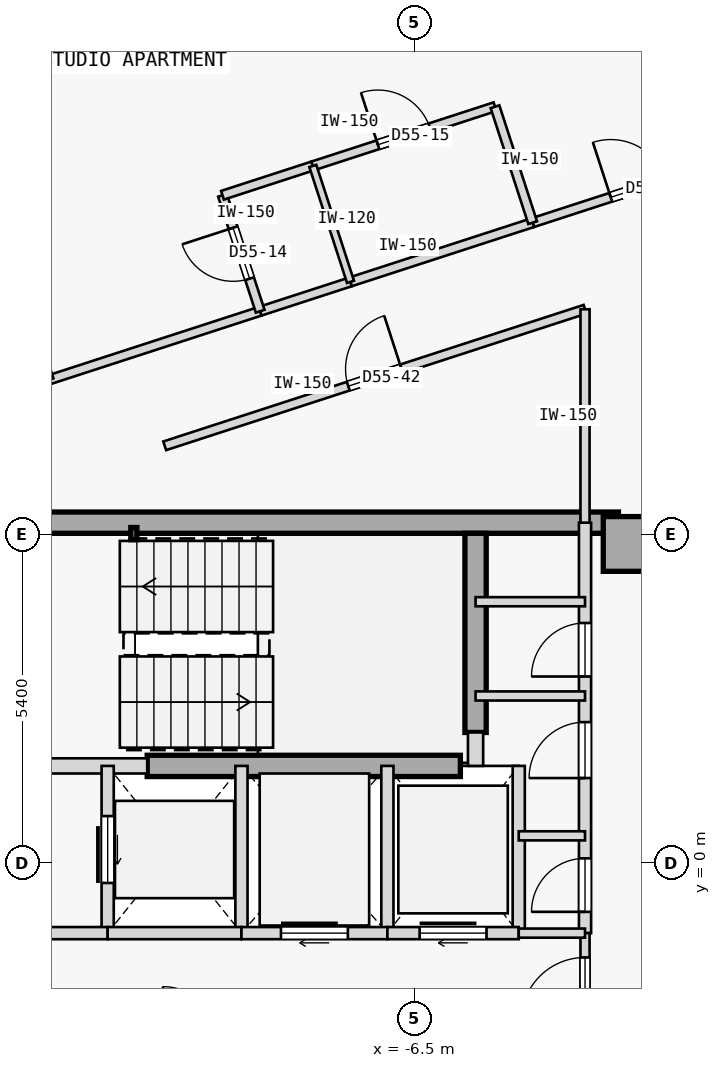
"""IFC4 building model, lengths in metres.
Left out: names, types, materials, properties, quantities, classifications, styles, units other than length and angle.
Written with IfcOpenShell. Run it as: python <this file> out.ifc"""

import sys

from ifc_helpers import new_model, si_unit, direction, frame, frame_2d, origin, origin_2d, place, context, subcontext, project, spatial, rectangle, hollow_rectangle, extrude, element, fill, save


model = new_model("IFC4")
c1 = context("Model", 3, precision=1e-05, world=origin(), true_north=direction((0.0, 1.0)))
c2 = subcontext(c1, "Body", "Model", "MODEL_VIEW")
j1 = project(units=[si_unit("LENGTHUNIT", "METRE"), si_unit("PLANEANGLEUNIT", "RADIAN")], contexts=[c1])
p1 = place(None, origin())
s1 = spatial("IfcSite", under=j1, at=p1, CompositionType="ELEMENT")
p2 = place(p1, origin())
s2 = spatial("IfcBuilding", under=s1, at=p2, CompositionType="ELEMENT")
p3 = place(p2, frame((0.0, 0.0, 210.9)))
s3 = spatial("IfcBuildingStorey", under=s2, at=p3, CompositionType="ELEMENT", Elevation=210.9)
p4 = place(p3, frame((-2.95, 5.25, 0.0), z_axis=(0.0, 0.0, 1.0), x_axis=(1.0, 0.0, 0.0)))
e1 = element("IfcColumn", 1, at=p4, inside=s3, PredefinedType="COLUMN", context=c2, shape_type="SweptSolid", body=[
    extrude(rectangle(XDim=0.9, YDim=0.9, at=origin_2d()), origin(), (0.0, 0.0, 1.0), 3.35),
])
p5 = place(p3, frame((-14.56, 5.6, 0.0), z_axis=(0.0, 0.0, 1.0), x_axis=(1.0, 0.0, 0.0)))
e2 = element("IfcWall", 2, at=p5, inside=s3, PredefinedType="SHEAR", context=c2, shape_type="SweptSolid", body=[
    extrude(rectangle(XDim=11.41, YDim=0.35, at=frame_2d((5.705, 0.0))), origin(), (0.0, 0.0, 1.0), 3.125),
])
p6 = place(p3, frame((-5.5, 2.15, 0.0), z_axis=(0.0, 0.0, 1.0), x_axis=(0.0, 1.0, 0.0)))
e3 = element("IfcWall", 3, at=p6, inside=s3, PredefinedType="SHEAR", context=c2, shape_type="SweptSolid", body=[
    extrude(rectangle(XDim=3.275, YDim=0.35, at=frame_2d((1.638, 0.0))), origin(), (0.0, 0.0, 1.0), 3.125),
])
p7 = place(p3, frame((-10.9, 1.6, 0.0), z_axis=(0.0, 0.0, 1.0), x_axis=(1.0, 0.0, 0.0)))
e4 = element("IfcWall", 4, at=p7, inside=s3, PredefinedType="SHEAR", context=c2, shape_type="SweptSolid", body=[
    extrude(rectangle(XDim=5.15, YDim=0.35, at=frame_2d((2.575, 0.0))), origin(), (0.0, 0.0, 1.0), 3.125),
])
p8 = place(p3, frame((-11.12, 5.42, 0.0), z_axis=(0.0, 0.0, 1.0), x_axis=(1.0, 0.0, 0.0)))
e5 = element("IfcColumn", 5, at=p8, inside=s3, PredefinedType="COLUMN", context=c2, shape_type="SweptSolid", body=[
    extrude(hollow_rectangle(XDim=0.1, YDim=0.2, WallThickness=0.008, at=origin_2d()), origin(), (0.0, 0.0, 1.0), 3.35),
])
p9 = place(p3, frame((-14.5, 1.6, 0.0), z_axis=(0.0, 0.0, 1.0), x_axis=(1.0, 0.0, 0.0)))
e6 = element("IfcWall", 6, at=p9, inside=s3, PredefinedType="STANDARD", context=c2, shape_type="SweptSolid", body=[
    extrude(rectangle(XDim=3.6, YDim=0.25, at=frame_2d((1.8, 0.0))), origin(), (0.0, 0.0, 1.0), 3.125),
])
p10 = place(p9, frame((0.92, 0.0, 0.0)))
e7 = element("IfcOpeningElement", 7, at=p10, cuts=e6, PredefinedType="OPENING", context=c2, shape_type="SweptSolid", body=[
    extrude(rectangle(XDim=1.05, YDim=2.15, at=frame_2d((0.525, 1.075))), frame((0.0, 0.135, 0.0), z_axis=(0.0, -1.0, 0.0), x_axis=(1.0, 0.0, 0.0)), (0.0, 0.0, 1.0), 0.27),
])
p11 = place(p3, frame((-5.5, 1.6, 0.0), z_axis=(0.0, 0.0, 1.0), x_axis=(0.0, 1.0, 0.0)))
e8 = element("IfcWall", 8, at=p11, inside=s3, PredefinedType="STANDARD", context=c2, shape_type="SweptSolid", body=[
    extrude(rectangle(XDim=0.55, YDim=0.25, at=frame_2d((0.275, 0.0))), origin(), (0.0, 0.0, 1.0), 3.125),
])
p12 = place(p3, frame((-3.7, -1.15, 0.0), z_axis=(0.0, 0.0, 1.0), x_axis=(0.0, 1.0, 0.0)))
e9 = element("IfcWall", 9, at=p12, inside=s3, PredefinedType="STANDARD", context=c2, shape_type="SweptSolid", body=[
    extrude(rectangle(XDim=6.75, YDim=0.2, at=frame_2d((3.375, 0.0))), origin(), (0.0, 0.0, 1.0), 3.125),
])
p13 = place(p12, frame((0.35, 0.0, 0.0)))
e10 = element("IfcOpeningElement", 10, at=p13, cuts=e9, PredefinedType="OPENING", context=c2, shape_type="SweptSolid", body=[
    extrude(rectangle(XDim=0.88, YDim=2.15, at=frame_2d((0.44, 1.075))), frame((0.0, 0.11, 0.0), z_axis=(0.0, -1.0, 0.0), x_axis=(1.0, 0.0, 0.0)), (0.0, 0.0, 1.0), 0.22),
])
p14 = place(p12, frame((2.55, 0.0, 0.0)))
e11 = element("IfcOpeningElement", 11, at=p14, cuts=e9, PredefinedType="OPENING", context=c2, shape_type="SweptSolid", body=[
    extrude(rectangle(XDim=0.92, YDim=2.15, at=frame_2d((0.46, 1.075))), frame((0.0, 0.11, 0.0), z_axis=(0.0, -1.0, 0.0), x_axis=(1.0, 0.0, 0.0)), (0.0, 0.0, 1.0), 0.22),
])
p15 = place(p12, frame((4.22, 0.0, 0.0)))
e12 = element("IfcOpeningElement", 12, at=p15, cuts=e9, PredefinedType="OPENING", context=c2, shape_type="SweptSolid", body=[
    extrude(rectangle(XDim=0.88, YDim=2.15, at=frame_2d((0.44, 1.075))), frame((0.0, 0.11, 0.0), z_axis=(0.0, -1.0, 0.0), x_axis=(1.0, 0.0, 0.0)), (0.0, 0.0, 1.0), 0.22),
])
p16 = place(p3, frame((-3.7, -2.95, 0.0), z_axis=(0.0, 0.0, 1.0), x_axis=(0.0, 1.0, 0.0)))
e13 = element("IfcWall", 13, at=p16, inside=s3, PredefinedType="PARTITIONING", context=c2, shape_type="SweptSolid", body=[
    extrude(rectangle(XDim=1.8, YDim=0.15, at=frame_2d((0.9, 0.0))), origin(), (0.0, 0.0, 1.0), 3.125),
])
p17 = place(p16, frame((0.35, 0.0, 0.0)))
e14 = element("IfcOpeningElement", 14, at=p17, cuts=e13, PredefinedType="OPENING", context=c2, shape_type="SweptSolid", body=[
    extrude(rectangle(XDim=1.05, YDim=2.18, at=frame_2d((0.525, 1.09))), frame((0.0, 0.085, 0.0), z_axis=(0.0, -1.0, 0.0), x_axis=(1.0, 0.0, 0.0)), (0.0, 0.0, 1.0), 0.17),
])
p18 = place(p3, frame((-11.55, -1.15, 0.0), z_axis=(0.0, 0.0, 1.0), x_axis=(0.0, 1.0, 0.0)))
e15 = element("IfcWall", 15, at=p18, inside=s3, PredefinedType="STANDARD", context=c2, shape_type="SweptSolid", body=[
    extrude(rectangle(XDim=2.75, YDim=0.2, at=frame_2d((1.375, 0.0))), origin(), (0.0, 0.0, 1.0), 3.125),
])
p19 = place(p18, frame((0.825, 0.0, 0.0)))
e16 = element("IfcOpeningElement", 16, at=p19, cuts=e15, PredefinedType="OPENING", context=c2, shape_type="SweptSolid", body=[
    extrude(rectangle(XDim=1.1, YDim=2.15, at=frame_2d((0.55, 1.075))), frame((0.0, 0.11, 0.0), z_axis=(0.0, -1.0, 0.0), x_axis=(1.0, 0.0, 0.0)), (0.0, 0.0, 1.0), 0.22),
])
p20 = place(p3, frame((-9.35, -1.15, 0.0), z_axis=(0.0, 0.0, 1.0), x_axis=(0.0, 1.0, 0.0)))
e17 = element("IfcWall", 17, at=p20, inside=s3, PredefinedType="STANDARD", context=c2, shape_type="SweptSolid", body=[
    extrude(rectangle(XDim=2.75, YDim=0.2, at=frame_2d((1.375, 0.0))), origin(), (0.0, 0.0, 1.0), 3.125),
])
p21 = place(p3, frame((-14.5, -1.15, 0.0), z_axis=(0.0, 0.0, 1.0), x_axis=(1.0, 0.0, 0.0)))
e18 = element("IfcWall", 18, at=p21, inside=s3, PredefinedType="STANDARD", context=c2, shape_type="SweptSolid", body=[
    extrude(rectangle(XDim=2.95, YDim=0.2, at=frame_2d((1.475, 0.0))), origin(), (0.0, 0.0, 1.0), 3.125),
])
p22 = place(p21, frame((0.75, 0.0, 0.0)))
e19 = element("IfcOpeningElement", 19, at=p22, cuts=e18, PredefinedType="OPENING", context=c2, shape_type="SweptSolid", body=[
    extrude(rectangle(XDim=1.05, YDim=2.18, at=frame_2d((0.525, 1.09))), frame((0.0, 0.11, 0.0), z_axis=(0.0, -1.0, 0.0), x_axis=(1.0, 0.0, 0.0)), (0.0, 0.0, 1.0), 0.22),
])
p23 = place(p3, frame((-11.55, -1.15, 0.0), z_axis=(0.0, 0.0, 1.0), x_axis=(1.0, 0.0, 0.0)))
e20 = element("IfcWall", 20, at=p23, inside=s3, PredefinedType="STANDARD", context=c2, shape_type="SweptSolid", body=[
    extrude(rectangle(XDim=2.2, YDim=0.2, at=frame_2d((1.1, 0.0))), origin(), (0.0, 0.0, 1.0), 3.125),
])
p24 = place(p3, frame((-6.95, -1.15, 0.0), z_axis=(0.0, 0.0, 1.0), x_axis=(0.0, 1.0, 0.0)))
e21 = element("IfcWall", 21, at=p24, inside=s3, PredefinedType="STANDARD", context=c2, shape_type="SweptSolid", body=[
    extrude(rectangle(XDim=2.75, YDim=0.2, at=frame_2d((1.375, 0.0))), origin(), (0.0, 0.0, 1.0), 3.125),
])
p25 = place(p3, frame((-9.35, -1.15, 0.0), z_axis=(0.0, 0.0, 1.0), x_axis=(1.0, 0.0, 0.0)))
e22 = element("IfcWall", 22, at=p25, inside=s3, PredefinedType="STANDARD", context=c2, shape_type="SweptSolid", body=[
    extrude(rectangle(XDim=2.4, YDim=0.2, at=frame_2d((1.2, 0.0))), origin(), (0.0, 0.0, 1.0), 3.125),
])
p26 = place(p25, frame((0.65, 0.0, 0.0)))
e23 = element("IfcOpeningElement", 23, at=p26, cuts=e22, PredefinedType="OPENING", context=c2, shape_type="SweptSolid", body=[
    extrude(rectangle(XDim=1.1, YDim=2.15, at=frame_2d((0.55, 1.075))), frame((0.0, 0.11, 0.0), z_axis=(0.0, -1.0, 0.0), x_axis=(1.0, 0.0, 0.0)), (0.0, 0.0, 1.0), 0.22),
])
p27 = place(p3, frame((-4.79, -1.15, 0.0), z_axis=(0.0, 0.0, 1.0), x_axis=(0.0, 1.0, 0.0)))
e24 = element("IfcWall", 24, at=p27, inside=s3, PredefinedType="STANDARD", context=c2, shape_type="SweptSolid", body=[
    extrude(rectangle(XDim=2.75, YDim=0.2, at=frame_2d((1.375, 0.0))), origin(), (0.0, 0.0, 1.0), 3.125),
])
p28 = place(p3, frame((-6.95, -1.15, 0.0), z_axis=(0.0, 0.0, 1.0), x_axis=(1.0, 0.0, 0.0)))
e25 = element("IfcWall", 25, at=p28, inside=s3, PredefinedType="STANDARD", context=c2, shape_type="SweptSolid", body=[
    extrude(rectangle(XDim=2.16, YDim=0.2, at=frame_2d((1.08, 0.0))), origin(), (0.0, 0.0, 1.0), 3.125),
])
p29 = place(p28, frame((0.53, 0.0, 0.0)))
e26 = element("IfcOpeningElement", 26, at=p29, cuts=e25, PredefinedType="OPENING", context=c2, shape_type="SweptSolid", body=[
    extrude(rectangle(XDim=1.1, YDim=2.15, at=frame_2d((0.55, 1.075))), frame((0.0, 0.11, 0.0), z_axis=(0.0, -1.0, 0.0), x_axis=(1.0, 0.0, 0.0)), (0.0, 0.0, 1.0), 0.22),
])
p30 = place(p3, frame((-4.79, -1.15, 0.0), z_axis=(0.0, 0.0, 1.0), x_axis=(1.0, 0.0, 0.0)))
e27 = element("IfcWall", 27, at=p30, inside=s3, PredefinedType="PARTITIONING", context=c2, shape_type="SweptSolid", body=[
    extrude(rectangle(XDim=1.09, YDim=0.15, at=frame_2d((0.545, 0.0))), origin(), (0.0, 0.0, 1.0), 3.125),
])
p31 = place(p3, frame((-5.5, 4.3, 0.0), z_axis=(0.0, 0.0, 1.0), x_axis=(1.0, 0.0, 0.0)))
e28 = element("IfcWall", 28, at=p31, inside=s3, PredefinedType="PARTITIONING", context=c2, shape_type="SweptSolid", body=[
    extrude(rectangle(XDim=1.8, YDim=0.15, at=frame_2d((0.9, 0.0))), origin(), (0.0, 0.0, 1.0), 3.125),
])
p32 = place(p3, frame((-4.79, 0.45, 0.0), z_axis=(0.0, 0.0, 1.0), x_axis=(1.0, 0.0, 0.0)))
e29 = element("IfcWall", 29, at=p32, inside=s3, PredefinedType="PARTITIONING", context=c2, shape_type="SweptSolid", body=[
    extrude(rectangle(XDim=1.09, YDim=0.15, at=frame_2d((0.545, 0.0))), origin(), (0.0, 0.0, 1.0), 3.125),
])
p33 = place(p3, frame((-5.5, 2.75, 0.0), z_axis=(0.0, 0.0, 1.0), x_axis=(1.0, 0.0, 0.0)))
e30 = element("IfcWall", 30, at=p33, inside=s3, PredefinedType="PARTITIONING", context=c2, shape_type="SweptSolid", body=[
    extrude(rectangle(XDim=1.8, YDim=0.15, at=frame_2d((0.9, 0.0))), origin(), (0.0, 0.0, 1.0), 3.125),
])
p34 = place(p3, frame((-12.513, 7.949, 0.0), z_axis=(0.0, 0.0, 1.0), x_axis=(0.951050780541, 0.309034646652, 0.0)))
e31 = element("IfcWall", 31, at=p34, inside=s3, PredefinedType="PARTITIONING", context=c2, shape_type="SweptSolid", body=[
    extrude(rectangle(XDim=3.65, YDim=0.15, at=frame_2d((1.825, 0.0))), origin(), (0.0, 0.0, 1.0), 3.125),
])
p35 = place(p3, frame((-4.561, 10.533, 0.0), z_axis=(0.0, 0.0, 1.0), x_axis=(0.951057168147, 0.309014988174, 0.0)))
e32 = element("IfcWall", 32, at=p35, inside=s3, PredefinedType="PARTITIONING", context=c2, shape_type="SweptSolid", body=[
    extrude(rectangle(XDim=3.65, YDim=0.15, at=frame_2d((1.825, 0.0))), origin(), (0.0, 0.0, 1.0), 3.125),
])
p36 = place(p35, frame((1.35, 0.0, 0.0)))
e33 = element("IfcOpeningElement", 33, at=p36, cuts=e32, PredefinedType="OPENING", context=c2, shape_type="SweptSolid", body=[
    extrude(rectangle(XDim=0.95, YDim=2.15, at=frame_2d((0.475, 1.075))), frame((0.0, 0.085, 0.0), z_axis=(0.0, -1.0, 0.0), x_axis=(1.0, 0.0, 0.0)), (0.0, 0.0, 1.0), 0.17),
])
p37 = place(p3, frame((-9.042, 9.077, 0.0), z_axis=(0.0, 0.0, 1.0), x_axis=(0.951062779317, 0.308997718112, 0.0)))
e34 = element("IfcWall", 34, at=p37, inside=s3, PredefinedType="PARTITIONING", context=c2, shape_type="SweptSolid", body=[
    extrude(rectangle(XDim=1.562, YDim=0.15, at=frame_2d((0.781, 0.0))), origin(), (0.0, 0.0, 1.0), 3.125),
])
p38 = place(p3, frame((-7.557, 9.56, 0.0), z_axis=(0.0, 0.0, 1.0), x_axis=(0.951058557014, 0.309010713619, 0.0)))
e35 = element("IfcWall", 35, at=p38, inside=s3, PredefinedType="PARTITIONING", context=c2, shape_type="SweptSolid", body=[
    extrude(rectangle(XDim=3.15, YDim=0.15, at=frame_2d((1.575, 0.0))), origin(), (0.0, 0.0, 1.0), 3.125),
])
p39 = place(p3, frame((-10.612, 6.864, 0.0), z_axis=(0.0, 0.0, 1.0), x_axis=(0.951060972078, 0.309003280548, 0.0)))
e36 = element("IfcWall", 36, at=p39, inside=s3, PredefinedType="PARTITIONING", context=c2, shape_type="SweptSolid", body=[
    extrude(rectangle(XDim=7.268, YDim=0.15, at=frame_2d((3.634, 0.0))), origin(), (0.0, 0.0, 1.0), 3.125),
])
p40 = place(p39, frame((3.174, 0.0, 0.0)))
e37 = element("IfcOpeningElement", 37, at=p40, cuts=e36, PredefinedType="OPENING", context=c2, shape_type="SweptSolid", body=[
    extrude(rectangle(XDim=0.92, YDim=2.15, at=frame_2d((0.46, 1.075))), frame((0.0, 0.085, 0.0), z_axis=(0.0, -1.0, 0.0), x_axis=(1.0, 0.0, 0.0)), (0.0, 0.0, 1.0), 0.17),
])
p41 = place(p3, frame((-3.7, 5.6, 0.0), z_axis=(0.0, 0.0, 1.0), x_axis=(0.000139120755, 0.999999990323, 0.0)))
e38 = element("IfcWall", 38, at=p41, inside=s3, PredefinedType="PARTITIONING", context=c2, shape_type="SweptSolid", body=[
    extrude(rectangle(XDim=3.51, YDim=0.15, at=frame_2d((1.755, 0.0))), origin(), (0.0, 0.0, 1.0), 3.125),
])
p42 = place(p3, frame((-9.042, 9.077, 0.0), z_axis=(0.0, 0.0, 1.0), x_axis=(-0.308912611775, 0.951090425925, 0.0)))
e39 = element("IfcWall", 39, at=p42, inside=s3, PredefinedType="PARTITIONING", context=c2, shape_type="SweptSolid", body=[
    extrude(rectangle(XDim=2.005, YDim=0.15, at=frame_2d((1.002, 0.0))), origin(), (0.0, 0.0, 1.0), 3.125),
])
p43 = place(p42, frame((0.562, 0.0, 0.0)))
e40 = element("IfcOpeningElement", 40, at=p43, cuts=e39, PredefinedType="OPENING", context=c2, shape_type="SweptSolid", body=[
    extrude(rectangle(XDim=0.88, YDim=2.15, at=frame_2d((0.44, 1.075))), frame((0.0, 0.085, 0.0), z_axis=(0.0, -1.0, 0.0), x_axis=(1.0, 0.0, 0.0)), (0.0, 0.0, 1.0), 0.17),
])
p44 = place(p3, frame((-9.662, 10.984, 0.0), z_axis=(0.0, 0.0, 1.0), x_axis=(0.951047852885, 0.309043656337, 0.0)))
e41 = element("IfcWall", 41, at=p44, inside=s3, PredefinedType="PARTITIONING", context=c2, shape_type="SweptSolid", body=[
    extrude(rectangle(XDim=1.562, YDim=0.15, at=frame_2d((0.781, 0.0))), origin(), (0.0, 0.0, 1.0), 3.125),
])
p45 = place(p3, frame((-8.176, 11.467, 0.0), z_axis=(0.0, 0.0, 1.0), x_axis=(0.951058557014, 0.309010713619, 0.0)))
e42 = element("IfcWall", 42, at=p45, inside=s3, PredefinedType="PARTITIONING", context=c2, shape_type="SweptSolid", body=[
    extrude(rectangle(XDim=3.15, YDim=0.15, at=frame_2d((1.575, 0.0))), origin(), (0.0, 0.0, 1.0), 3.125),
])
p46 = place(p45, frame((1.125, 0.0, 0.0)))
e43 = element("IfcOpeningElement", 43, at=p46, cuts=e42, PredefinedType="OPENING", context=c2, shape_type="SweptSolid", body=[
    extrude(rectangle(XDim=0.9, YDim=2.15, at=frame_2d((0.45, 1.075))), frame((0.0, 0.085, 0.0), z_axis=(0.0, -1.0, 0.0), x_axis=(1.0, 0.0, 0.0)), (0.0, 0.0, 1.0), 0.17),
])
p47 = place(p3, frame((-4.561, 10.533, 0.0), z_axis=(0.0, 0.0, 1.0), x_axis=(-0.309022749039, 0.951054646472, 0.0)))
e44 = element("IfcWall", 44, at=p47, inside=s3, PredefinedType="PARTITIONING", context=c2, shape_type="SweptSolid", body=[
    extrude(rectangle(XDim=2.005, YDim=0.15, at=frame_2d((1.002, 0.0))), origin(), (0.0, 0.0, 1.0), 3.125),
])
p48 = place(p3, frame((-12.513, 7.949, 0.0), z_axis=(0.0, 0.0, 1.0), x_axis=(-0.309062527822, 0.951041720376, 0.0)))
e45 = element("IfcWall", 45, at=p48, inside=s3, PredefinedType="PARTITIONING", context=c2, shape_type="SweptSolid", body=[
    extrude(rectangle(XDim=2.579, YDim=0.15, at=frame_2d((1.29, 0.0))), origin(), (0.0, 0.0, 1.0), 3.125),
])
p49 = place(p3, frame((-1.089, 11.661, 0.0), z_axis=(0.0, 0.0, 1.0), x_axis=(-0.309029230739, 0.951052540372, 0.0)))
e46 = element("IfcWall", 46, at=p49, inside=s3, PredefinedType="PARTITIONING", context=c2, shape_type="SweptSolid", body=[
    extrude(rectangle(XDim=7.284, YDim=0.15, at=frame_2d((3.642, 0.0))), origin(), (0.0, 0.0, 1.0), 3.125),
])
p50 = place(p3, frame((-7.557, 9.56, 0.0), z_axis=(0.0, 0.0, 1.0), x_axis=(-0.309022749039, 0.951054646472, 0.0)))
e47 = element("IfcWall", 47, at=p50, inside=s3, PredefinedType="PARTITIONING", context=c2, shape_type="SweptSolid", body=[
    extrude(rectangle(XDim=2.005, YDim=0.12, at=frame_2d((1.002, 0.0))), origin(), (0.0, 0.0, 1.0), 3.125),
])
p51 = place(p17, origin())
e48 = element("IfcDoor", 48, at=p51, inside=s3, OperationType="SINGLE_SWING_LEFT", PredefinedType="DOOR", context=c2, shape_type="SweptSolid", body=[
    extrude(rectangle(XDim=1.05, YDim=2.18, at=frame_2d((0.525, 1.09))), frame((0.0, 0.025, 0.0), z_axis=(0.0, -1.0, 0.0), x_axis=(1.0, 0.0, 0.0)), (0.0, 0.0, 1.0), 0.05),
])
fill(e14, e48)
p52 = place(p19, origin())
e49 = element("IfcDoor", 49, at=p52, inside=s3, OperationType="SLIDING_TO_RIGHT", PredefinedType="DOOR", context=c2, shape_type="SweptSolid", body=[
    extrude(rectangle(XDim=1.1, YDim=2.15, at=frame_2d((0.55, 1.075))), frame((0.0, 0.025, 0.0), z_axis=(0.0, -1.0, 0.0), x_axis=(1.0, 0.0, 0.0)), (0.0, 0.0, 1.0), 0.05),
])
fill(e16, e49)
p53 = place(p26, origin())
e50 = element("IfcDoor", 50, at=p53, inside=s3, OperationType="SLIDING_TO_RIGHT", PredefinedType="DOOR", context=c2, shape_type="SweptSolid", body=[
    extrude(rectangle(XDim=1.1, YDim=2.15, at=frame_2d((0.55, 1.075))), frame((0.0, 0.025, 0.0), z_axis=(0.0, -1.0, 0.0), x_axis=(1.0, 0.0, 0.0)), (0.0, 0.0, 1.0), 0.05),
])
fill(e23, e50)
p54 = place(p29, origin())
e51 = element("IfcDoor", 51, at=p54, inside=s3, OperationType="SLIDING_TO_RIGHT", PredefinedType="DOOR", context=c2, shape_type="SweptSolid", body=[
    extrude(rectangle(XDim=1.1, YDim=2.15, at=frame_2d((0.55, 1.075))), frame((0.0, 0.025, 0.0), z_axis=(0.0, -1.0, 0.0), x_axis=(1.0, 0.0, 0.0)), (0.0, 0.0, 1.0), 0.05),
])
fill(e26, e51)
p55 = place(p13, origin())
e52 = element("IfcDoor", 52, at=p55, inside=s3, OperationType="SINGLE_SWING_LEFT", PredefinedType="DOOR", context=c2, shape_type="SweptSolid", body=[
    extrude(rectangle(XDim=0.88, YDim=2.15, at=frame_2d((0.44, 1.075))), frame((0.0, 0.025, 0.0), z_axis=(0.0, -1.0, 0.0), x_axis=(1.0, 0.0, 0.0)), (0.0, 0.0, 1.0), 0.05),
])
fill(e10, e52)
p56 = place(p14, origin())
e53 = element("IfcDoor", 53, at=p56, inside=s3, OperationType="SINGLE_SWING_LEFT", PredefinedType="DOOR", context=c2, shape_type="SweptSolid", body=[
    extrude(rectangle(XDim=0.92, YDim=2.15, at=frame_2d((0.46, 1.075))), frame((0.0, 0.025, 0.0), z_axis=(0.0, -1.0, 0.0), x_axis=(1.0, 0.0, 0.0)), (0.0, 0.0, 1.0), 0.05),
])
fill(e11, e53)
p57 = place(p15, origin())
e54 = element("IfcDoor", 54, at=p57, inside=s3, OperationType="SINGLE_SWING_LEFT", PredefinedType="DOOR", context=c2, shape_type="SweptSolid", body=[
    extrude(rectangle(XDim=0.88, YDim=2.15, at=frame_2d((0.44, 1.075))), frame((0.0, 0.025, 0.0), z_axis=(0.0, -1.0, 0.0), x_axis=(1.0, 0.0, 0.0)), (0.0, 0.0, 1.0), 0.05),
])
fill(e12, e54)
p58 = place(p36, origin())
e55 = element("IfcDoor", 55, at=p58, inside=s3, OperationType="SINGLE_SWING_LEFT", PredefinedType="DOOR", context=c2, shape_type="SweptSolid", body=[
    extrude(rectangle(XDim=0.95, YDim=2.15, at=frame_2d((0.475, 1.075))), frame((0.0, 0.025, 0.0), z_axis=(0.0, -1.0, 0.0), x_axis=(1.0, 0.0, 0.0)), (0.0, 0.0, 1.0), 0.05),
])
fill(e33, e55)
p59 = place(p43, origin())
e56 = element("IfcDoor", 56, at=p59, inside=s3, OperationType="SINGLE_SWING_RIGHT", PredefinedType="DOOR", context=c2, shape_type="SweptSolid", body=[
    extrude(rectangle(XDim=0.88, YDim=2.15, at=frame_2d((0.44, 1.075))), frame((0.0, 0.025, 0.0), z_axis=(0.0, -1.0, 0.0), x_axis=(1.0, 0.0, 0.0)), (0.0, 0.0, 1.0), 0.05),
])
fill(e40, e56)
p60 = place(p46, origin())
e57 = element("IfcDoor", 57, at=p60, inside=s3, OperationType="SINGLE_SWING_LEFT", PredefinedType="DOOR", context=c2, shape_type="SweptSolid", body=[
    extrude(rectangle(XDim=0.9, YDim=2.15, at=frame_2d((0.45, 1.075))), frame((0.0, 0.025, 0.0), z_axis=(0.0, -1.0, 0.0), x_axis=(1.0, 0.0, 0.0)), (0.0, 0.0, 1.0), 0.05),
])
fill(e43, e57)
p61 = place(p40, origin())
e58 = element("IfcDoor", 58, at=p61, inside=s3, OperationType="SINGLE_SWING_RIGHT", PredefinedType="DOOR", context=c2, shape_type="SweptSolid", body=[
    extrude(rectangle(XDim=0.92, YDim=2.15, at=frame_2d((0.46, 1.075))), frame((0.0, 0.025, 0.0), z_axis=(0.0, -1.0, 0.0), x_axis=(1.0, 0.0, 0.0)), (0.0, 0.0, 1.0), 0.05),
])
fill(e37, e58)
save(model, sys.argv[1])
